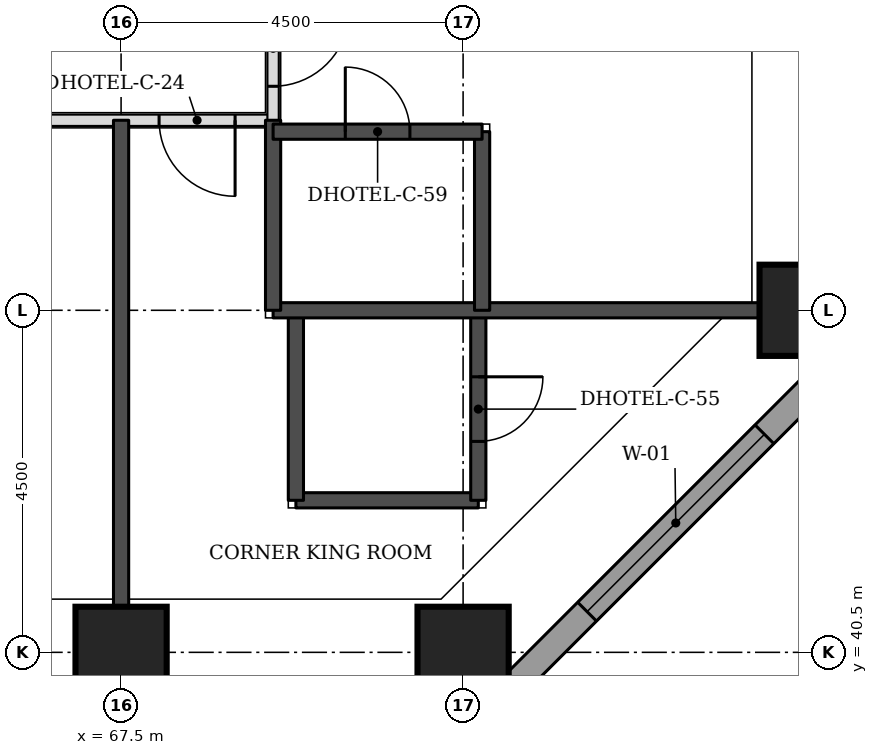
"""IFC4 building model, lengths in metres.
Left out: names, types, materials, properties, quantities, classifications, styles, units other than length and angle.
Written with IfcOpenShell. Run it as: python <this file> out.ifc"""

import sys

from ifc_helpers import new_model, si_unit, direction, frame, frame_2d, origin, origin_2d, place, context, subcontext, project, spatial, rectangle, extrude, element, fill, save


model = new_model("IFC4")
c1 = context("Model", 3, precision=1e-05, world=origin(), true_north=direction((0.0, 1.0)))
c2 = subcontext(c1, "Body", "Model", "MODEL_VIEW")
j1 = project(units=[si_unit("LENGTHUNIT", "METRE"), si_unit("PLANEANGLEUNIT", "RADIAN")], contexts=[c1])
p1 = place(None, origin())
s1 = spatial("IfcSite", under=j1, at=p1, CompositionType="ELEMENT")
p2 = place(p1, origin())
s2 = spatial("IfcBuilding", under=s1, at=p2, CompositionType="ELEMENT")
p3 = place(p2, frame((0.0, 0.0, 33.0)))
s3 = spatial("IfcBuildingStorey", under=s2, at=p3, CompositionType="ELEMENT", Elevation=33.0)
for number, where, z_axis, x_axis in (
    (1, (67.5, 40.5, 0.0), (0.0, 0.0, 1.0), (1.0, 0.0, 0.0)),
    (2, (72.0, 40.5, 0.0), (0.0, 0.0, 1.0), (1.0, 0.0, 0.0)),
    (3, (76.5, 45.0, 0.0), (0.0, 0.0, 1.0), (1.0, 0.0, 0.0)),
):
    element("IfcColumn", number, at=place(p3, frame(where, z_axis=z_axis, x_axis=x_axis)), inside=s3, PredefinedType="COLUMN", context=c2, shape_type="SweptSolid", body=[
        extrude(rectangle(XDim=1.2, YDim=1.2, at=origin_2d()), origin(), (0.0, 0.0, 1.0), 3.3),
    ])
p4 = place(p3, frame((72.27, 39.674, 0.0), z_axis=(0.0, 0.0, 1.0), x_axis=(0.707106781187, 0.707106781187, 0.0)))
e4 = element("IfcWall", 4, at=p4, inside=s3, PredefinedType="STANDARD", context=c2, shape_type="SweptSolid", body=[
    extrude(rectangle(XDim=7.151, YDim=0.35, at=frame_2d((3.576, 0.0))), origin(), (0.0, 0.0, 1.0), 3.055),
])
p5 = place(p4, frame((1.926, 0.0, 0.8)))
e5 = element("IfcOpeningElement", 5, at=p5, cuts=e4, PredefinedType="OPENING", context=c2, shape_type="SweptSolid", body=[
    extrude(rectangle(XDim=3.3, YDim=1.5, at=frame_2d((1.65, 0.75))), frame((0.0, 0.185, 0.0), z_axis=(0.0, -1.0, 0.0), x_axis=(1.0, 0.0, 0.0)), (0.0, 0.0, 1.0), 0.37),
])
p6 = place(p3, frame((52.85, 47.5, 0.0), z_axis=(0.0, 0.0, 1.0), x_axis=(1.0, 0.0, 0.0)))
e6 = element("IfcWall", 6, at=p6, inside=s3, PredefinedType="PARTITIONING", context=c2, shape_type="SweptSolid", body=[
    extrude(rectangle(XDim=16.65, YDim=0.15, at=frame_2d((8.325, 0.0))), origin(), (0.0, 0.0, 1.0), 3.08),
])
p7 = place(p6, frame((11.3, 0.0, 0.0)))
e7 = element("IfcOpeningElement", 7, at=p7, cuts=e6, PredefinedType="OPENING", context=c2, shape_type="SweptSolid", body=[
    extrude(rectangle(XDim=1.1, YDim=2.1, at=frame_2d((0.55, 1.05))), frame((0.0, 0.085, 0.0), z_axis=(0.0, -1.0, 0.0), x_axis=(1.0, 0.0, 0.0)), (0.0, 0.0, 1.0), 0.17),
])
p8 = place(p6, frame((15.15, 0.0, 0.0)))
e8 = element("IfcOpeningElement", 8, at=p8, cuts=e6, PredefinedType="OPENING", context=c2, shape_type="SweptSolid", body=[
    extrude(rectangle(XDim=1.0, YDim=2.1, at=frame_2d((0.5, 1.05))), frame((0.0, 0.085, 0.0), z_axis=(0.0, -1.0, 0.0), x_axis=(1.0, 0.0, 0.0)), (0.0, 0.0, 1.0), 0.17),
])
p9 = place(p3, frame((69.5, 47.5, 0.0), z_axis=(0.0, 0.0, 1.0), x_axis=(0.0, 1.0, 0.0)))
e9 = element("IfcWall", 9, at=p9, inside=s3, PredefinedType="PARTITIONING", context=c2, shape_type="SweptSolid", body=[
    extrude(rectangle(XDim=26.5, YDim=0.15, at=frame_2d((13.25, 0.0))), origin(), (0.0, 0.0, 1.0), 3.08),
])
p10 = place(p9, frame((25.053, 0.0, 0.0)))
e10 = element("IfcOpeningElement", 10, at=p10, cuts=e9, PredefinedType="OPENING", context=c2, shape_type="SweptSolid", body=[
    extrude(rectangle(XDim=1.0, YDim=2.1, at=frame_2d((0.5, 1.05))), frame((0.0, 0.085, 0.0), z_axis=(0.0, -1.0, 0.0), x_axis=(1.0, 0.0, 0.0)), (0.0, 0.0, 1.0), 0.17),
])
p11 = place(p9, frame((18.275, 0.0, 0.0)))
e11 = element("IfcOpeningElement", 11, at=p11, cuts=e9, PredefinedType="OPENING", context=c2, shape_type="SweptSolid", body=[
    extrude(rectangle(XDim=1.0, YDim=2.1, at=frame_2d((0.5, 1.05))), frame((0.0, 0.085, 0.0), z_axis=(0.0, -1.0, 0.0), x_axis=(1.0, 0.0, 0.0)), (0.0, 0.0, 1.0), 0.17),
])
p12 = place(p9, frame((12.15, 0.0, 0.0)))
e12 = element("IfcOpeningElement", 12, at=p12, cuts=e9, PredefinedType="OPENING", context=c2, shape_type="SweptSolid", body=[
    extrude(rectangle(XDim=1.1, YDim=2.1, at=frame_2d((0.55, 1.05))), frame((0.0, 0.085, 0.0), z_axis=(0.0, -1.0, 0.0), x_axis=(1.0, 0.0, 0.0)), (0.0, 0.0, 1.0), 0.17),
])
p13 = place(p9, frame((2.825, 0.0, 0.0)))
e13 = element("IfcOpeningElement", 13, at=p13, cuts=e9, PredefinedType="OPENING", context=c2, shape_type="SweptSolid", body=[
    extrude(rectangle(XDim=1.0, YDim=2.1, at=frame_2d((0.5, 1.05))), frame((0.0, 0.085, 0.0), z_axis=(0.0, -1.0, 0.0), x_axis=(1.0, 0.0, 0.0)), (0.0, 0.0, 1.0), 0.17),
])
p14 = place(p9, frame((0.447, 0.0, 0.0)))
e14 = element("IfcOpeningElement", 14, at=p14, cuts=e9, PredefinedType="OPENING", context=c2, shape_type="SweptSolid", body=[
    extrude(rectangle(XDim=1.0, YDim=2.1, at=frame_2d((0.5, 1.05))), frame((0.0, 0.085, 0.0), z_axis=(0.0, -1.0, 0.0), x_axis=(1.0, 0.0, 0.0)), (0.0, 0.0, 1.0), 0.17),
])
p15 = place(p3, frame((67.5, 41.1, 0.0), z_axis=(0.0, 0.0, 1.0), x_axis=(0.0, 1.0, 0.0)))
e15 = element("IfcWall", 15, at=p15, inside=s3, PredefinedType="SOLIDWALL", context=c2, shape_type="SweptSolid", body=[
    extrude(rectangle(XDim=6.4, YDim=0.2, at=frame_2d((3.2, 0.0))), origin(), (0.0, 0.0, 1.0), 3.08),
])
p16 = place(p3, frame((69.8, 42.5, 0.0), z_axis=(0.0, 0.0, 1.0), x_axis=(1.0, 0.0, 0.0)))
e16 = element("IfcWall", 16, at=p16, inside=s3, PredefinedType="SOLIDWALL", context=c2, shape_type="SweptSolid", body=[
    extrude(rectangle(XDim=2.4, YDim=0.2, at=frame_2d((1.2, 0.0))), origin(), (0.0, 0.0, 1.0), 3.08),
])
p17 = place(p3, frame((69.8, 42.5, 0.0), z_axis=(0.0, 0.0, 1.0), x_axis=(0.0, 1.0, 0.0)))
e17 = element("IfcWall", 17, at=p17, inside=s3, PredefinedType="SOLIDWALL", context=c2, shape_type="SweptSolid", body=[
    extrude(rectangle(XDim=2.5, YDim=0.2, at=frame_2d((1.25, 0.0))), origin(), (0.0, 0.0, 1.0), 3.08),
])
p18 = place(p3, frame((72.2, 42.5, 0.0), z_axis=(0.0, 0.0, 1.0), x_axis=(0.0, 1.0, 0.0)))
e18 = element("IfcWall", 18, at=p18, inside=s3, PredefinedType="SOLIDWALL", context=c2, shape_type="SweptSolid", body=[
    extrude(rectangle(XDim=2.5, YDim=0.2, at=frame_2d((1.25, 0.0))), origin(), (0.0, 0.0, 1.0), 3.08),
])
p19 = place(p18, frame((0.775, 0.0, 0.0)))
e19 = element("IfcOpeningElement", 19, at=p19, cuts=e18, PredefinedType="OPENING", context=c2, shape_type="SweptSolid", body=[
    extrude(rectangle(XDim=0.85, YDim=2.1, at=frame_2d((0.425, 1.05))), frame((0.0, 0.11, 0.0), z_axis=(0.0, -1.0, 0.0), x_axis=(1.0, 0.0, 0.0)), (0.0, 0.0, 1.0), 0.22),
])
p20 = place(p3, frame((69.5, 45.0, 0.0), z_axis=(0.0, 0.0, 1.0), x_axis=(1.0, 0.0, 0.0)))
e20 = element("IfcWall", 20, at=p20, inside=s3, PredefinedType="SOLIDWALL", context=c2, shape_type="SweptSolid", body=[
    extrude(rectangle(XDim=6.4, YDim=0.2, at=frame_2d((3.2, 0.0))), origin(), (0.0, 0.0, 1.0), 3.08),
])
p21 = place(p3, frame((69.5, 45.0, 0.0), z_axis=(0.0, 0.0, 1.0), x_axis=(0.0, 1.0, 0.0)))
e21 = element("IfcWall", 21, at=p21, inside=s3, PredefinedType="SOLIDWALL", context=c2, shape_type="SweptSolid", body=[
    extrude(rectangle(XDim=2.5, YDim=0.2, at=frame_2d((1.25, 0.0))), origin(), (0.0, 0.0, 1.0), 3.08),
])
p22 = place(p3, frame((72.25, 45.0, 0.0), z_axis=(0.0, 0.0, 1.0), x_axis=(0.0, 1.0, 0.0)))
e22 = element("IfcWall", 22, at=p22, inside=s3, PredefinedType="SOLIDWALL", context=c2, shape_type="SweptSolid", body=[
    extrude(rectangle(XDim=2.35, YDim=0.2, at=frame_2d((1.175, 0.0))), origin(), (0.0, 0.0, 1.0), 3.08),
])
p23 = place(p3, frame((69.5, 47.35, 0.0), z_axis=(0.0, 0.0, 1.0), x_axis=(1.0, 0.0, 0.0)))
e23 = element("IfcWall", 23, at=p23, inside=s3, PredefinedType="SOLIDWALL", context=c2, shape_type="SweptSolid", body=[
    extrude(rectangle(XDim=2.75, YDim=0.2, at=frame_2d((1.375, 0.0))), origin(), (0.0, 0.0, 1.0), 3.08),
])
p24 = place(p23, frame((0.95, 0.0, 0.0)))
e24 = element("IfcOpeningElement", 24, at=p24, cuts=e23, PredefinedType="OPENING", context=c2, shape_type="SweptSolid", body=[
    extrude(rectangle(XDim=0.85, YDim=2.1, at=frame_2d((0.425, 1.05))), frame((0.0, 0.11, 0.0), z_axis=(0.0, -1.0, 0.0), x_axis=(1.0, 0.0, 0.0)), (0.0, 0.0, 1.0), 0.22),
])
p25 = place(p5, origin())
e25 = element("IfcWindow", 25, at=p25, inside=s3, PartitioningType="SINGLE_PANEL", PredefinedType="WINDOW", context=c2, shape_type="SweptSolid", body=[
    extrude(rectangle(XDim=3.3, YDim=1.5, at=frame_2d((1.65, 0.75))), frame((0.0, 0.085, 0.0), z_axis=(0.0, -1.0, 0.0), x_axis=(1.0, 0.0, 0.0)), (0.0, 0.0, 1.0), 0.06),
])
fill(e5, e25)
p26 = place(p14, frame((1.0, 0.0, 0.0), z_axis=(0.0, 0.0, 1.0), x_axis=(-1.0, 0.0, 0.0)))
e26 = element("IfcDoor", 26, at=p26, inside=s3, OperationType="SINGLE_SWING_LEFT", PredefinedType="DOOR", context=c2, shape_type="SweptSolid", body=[
    extrude(rectangle(XDim=1.0, YDim=2.1, at=frame_2d((0.5, 1.05))), frame((0.0, 0.025, 0.0), z_axis=(0.0, -1.0, 0.0), x_axis=(1.0, 0.0, 0.0)), (0.0, 0.0, 1.0), 0.05),
])
fill(e14, e26)
p27 = place(p24, origin())
e27 = element("IfcDoor", 27, at=p27, inside=s3, OperationType="SINGLE_SWING_LEFT", PredefinedType="DOOR", context=c2, shape_type="SweptSolid", body=[
    extrude(rectangle(XDim=0.85, YDim=2.1, at=frame_2d((0.425, 1.05))), frame((0.0, 0.025, 0.0), z_axis=(0.0, -1.0, 0.0), x_axis=(1.0, 0.0, 0.0)), (0.0, 0.0, 1.0), 0.05),
])
fill(e24, e27)
p28 = place(p8, frame((1.0, 0.0, 0.0), z_axis=(0.0, 0.0, 1.0), x_axis=(-1.0, 0.0, 0.0)))
e28 = element("IfcDoor", 28, at=p28, inside=s3, OperationType="SINGLE_SWING_LEFT", PredefinedType="DOOR", context=c2, shape_type="SweptSolid", body=[
    extrude(rectangle(XDim=1.0, YDim=2.1, at=frame_2d((0.5, 1.05))), frame((0.0, 0.025, 0.0), z_axis=(0.0, -1.0, 0.0), x_axis=(1.0, 0.0, 0.0)), (0.0, 0.0, 1.0), 0.05),
])
fill(e8, e28)
p29 = place(p19, frame((0.85, 0.0, 0.0), z_axis=(0.0, 0.0, 1.0), x_axis=(-1.0, 0.0, 0.0)))
e29 = element("IfcDoor", 29, at=p29, inside=s3, OperationType="SINGLE_SWING_LEFT", PredefinedType="DOOR", context=c2, shape_type="SweptSolid", body=[
    extrude(rectangle(XDim=0.85, YDim=2.1, at=frame_2d((0.425, 1.05))), frame((0.0, 0.025, 0.0), z_axis=(0.0, -1.0, 0.0), x_axis=(1.0, 0.0, 0.0)), (0.0, 0.0, 1.0), 0.05),
])
fill(e19, e29)
save(model, sys.argv[1])
